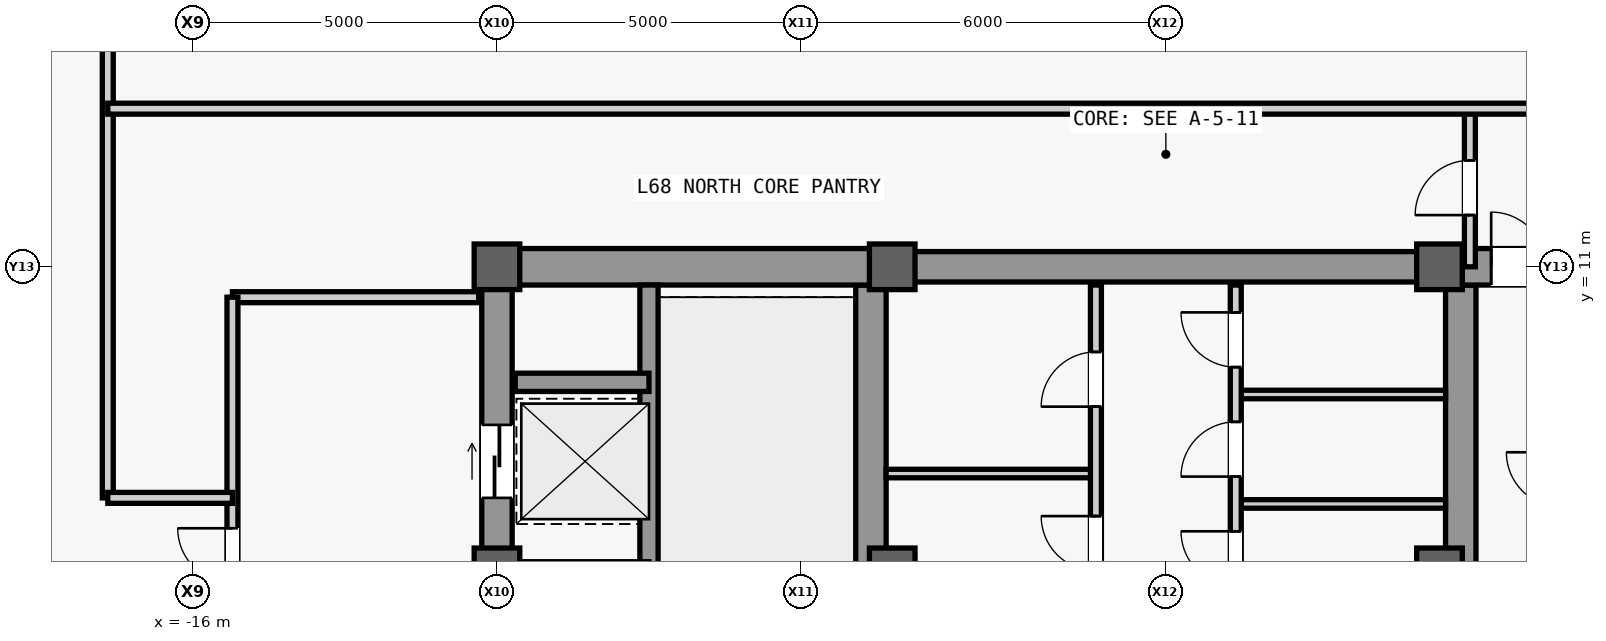
"""IFC4 building model, lengths in metres.
Left out: names, types, materials, properties, quantities, classifications, styles, units other than length and angle.
Written with IfcOpenShell. Run it as: python <this file> out.ifc"""

import sys

from ifc_helpers import new_model, si_unit, direction, frame, frame_2d, origin, origin_2d, place, context, subcontext, project, spatial, rectangle, extrude, source, transform, mapped, element, fill, save


model = new_model("IFC4")
c1 = context("Model", 3, precision=1e-05, world=origin(), true_north=direction((0.0, 1.0)))
c2 = subcontext(c1, "Body", "Model", "MODEL_VIEW")
j1 = project(units=[si_unit("LENGTHUNIT", "METRE"), si_unit("PLANEANGLEUNIT", "RADIAN")], contexts=[c1])
p1 = place(None, origin())
s1 = spatial("IfcSite", under=j1, at=p1, CompositionType="ELEMENT")
p2 = place(p1, origin())
s2 = spatial("IfcBuilding", under=s1, at=p2, CompositionType="ELEMENT")
p3 = place(p2, frame((0.0, 0.0, 289.5)))
s3 = spatial("IfcBuildingStorey", under=s2, at=p3, CompositionType="ELEMENT", Elevation=289.5)
m1 = source(origin(), c2, "Body", "SweptSolid", [
    extrude(rectangle(XDim=22.0, YDim=0.5, at=frame_2d((11.0, 0.0))), origin(), (0.0, 0.0, 1.0), 3.78),
])
p4 = place(p3, frame((-11.0, -11.0, 0.0), z_axis=(0.0, 0.0, 1.0), x_axis=(0.0, 1.0, 0.0)))
e1 = element("IfcWall", 1, at=p4, inside=s3, PredefinedType="SHEAR", context=c2, shape_type="MappedRepresentation", body=[
    mapped(m1, transform((0.0, 0.0, 0.0), scale=1.0)),
])
m2 = source(origin(), c2, "Body", "SweptSolid", [
    extrude(rectangle(XDim=1.1, YDim=2.2, at=frame_2d((0.55, 1.1))), frame((0.0, 0.26, 0.0), z_axis=(0.0, -1.0, 0.0), x_axis=(1.0, 0.0, 0.0)), (0.0, 0.0, 1.0), 0.52),
])
p5 = place(p4, frame((0.8, 0.0, 0.0)))
e2 = element("IfcOpeningElement", 2, at=p5, cuts=e1, PredefinedType="OPENING", context=c2, shape_type="MappedRepresentation", body=[
    mapped(m2, transform((0.0, 0.0, 0.0), scale=1.0)),
])
p6 = place(p4, frame((12.5, 0.0, 0.0)))
e3 = element("IfcOpeningElement", 3, at=p6, cuts=e1, PredefinedType="OPENING", context=c2, shape_type="MappedRepresentation", body=[
    mapped(m2, transform((0.0, 0.0, 0.0), scale=1.0)),
])
m3 = source(origin(), c2, "Body", "SweptSolid", [
    extrude(rectangle(XDim=0.9, YDim=2.15, at=frame_2d((0.45, 1.075))), frame((0.0, 0.26, 0.0), z_axis=(0.0, -1.0, 0.0), x_axis=(1.0, 0.0, 0.0)), (0.0, 0.0, 1.0), 0.52),
])
p7 = place(p4, frame((7.575, 0.0, 0.0)))
e4 = element("IfcOpeningElement", 4, at=p7, cuts=e1, PredefinedType="OPENING", context=c2, shape_type="MappedRepresentation", body=[
    mapped(m3, transform((0.0, 0.0, 0.0), scale=1.0)),
])
m4 = source(origin(), c2, "Body", "SweptSolid", [
    extrude(rectangle(XDim=1.2, YDim=2.3, at=frame_2d((0.6, 1.15))), frame((0.0, 0.26, 0.0), z_axis=(0.0, -1.0, 0.0), x_axis=(1.0, 0.0, 0.0)), (0.0, 0.0, 1.0), 0.52),
])
p8 = place(p4, frame((14.6, 0.0, 0.0)))
e5 = element("IfcOpeningElement", 5, at=p8, cuts=e1, PredefinedType="OPENING", context=c2, shape_type="MappedRepresentation", body=[
    mapped(m4, transform((0.0, 0.0, 0.0), scale=1.0)),
])
p9 = place(p4, frame((18.2, 0.0, 0.0)))
e6 = element("IfcOpeningElement", 6, at=p9, cuts=e1, PredefinedType="OPENING", context=c2, shape_type="MappedRepresentation", body=[
    mapped(m4, transform((0.0, 0.0, 0.0), scale=1.0)),
])
m5 = source(origin(), c2, "Body", "SweptSolid", [
    extrude(rectangle(XDim=1.3, YDim=2.3, at=frame_2d((0.65, 1.15))), frame((0.0, 0.26, 0.0), z_axis=(0.0, -1.0, 0.0), x_axis=(1.0, 0.0, 0.0)), (0.0, 0.0, 1.0), 0.52),
])
p10 = place(p4, frame((2.7, 0.0, 0.0)))
e7 = element("IfcOpeningElement", 7, at=p10, cuts=e1, PredefinedType="OPENING", context=c2, shape_type="MappedRepresentation", body=[
    mapped(m5, transform((0.0, 0.0, 0.0), scale=1.0)),
])
m6 = source(origin(), c2, "Body", "SweptSolid", [
    extrude(rectangle(XDim=21.4, YDim=0.5, at=frame_2d((10.7, 0.0))), origin(), (0.0, 0.0, 1.0), 3.78),
])
for number, where, z_axis, x_axis in (
    (8, (-4.85, -10.7, 0.0), (0.0, 0.0, 1.0), (0.0, 1.0, 0.0)),
    (9, (4.85, -10.7, 0.0), (0.0, 0.0, 1.0), (0.0, 1.0, 0.0)),
):
    element("IfcWall", number, at=place(p3, frame(where, z_axis=z_axis, x_axis=x_axis)), inside=s3, PredefinedType="SHEAR", context=c2, shape_type="MappedRepresentation", body=[
        mapped(m6, transform((0.0, 0.0, 0.0), scale=1.0)),
    ])
m7 = source(origin(), c2, "Body", "SweptSolid", [
    extrude(rectangle(XDim=5.9, YDim=0.6, at=frame_2d((2.95, 0.0))), origin(), (0.0, 0.0, 1.0), 3.78),
])
p11 = place(p3, frame((-10.75, 11.0, 0.0), z_axis=(0.0, 0.0, 1.0), x_axis=(1.0, 0.0, 0.0)))
e10 = element("IfcWall", 10, at=p11, inside=s3, PredefinedType="SHEAR", context=c2, shape_type="MappedRepresentation", body=[
    mapped(m7, transform((0.0, 0.0, 0.0), scale=1.0)),
])
p12 = place(p3, frame((4.85, 11.0, 0.0), z_axis=(0.0, 0.0, 1.0), x_axis=(1.0, 0.0, 0.0)))
e11 = element("IfcWall", 11, at=p12, inside=s3, PredefinedType="SHEAR", context=c2, shape_type="MappedRepresentation", body=[
    mapped(m7, transform((0.0, 0.0, 0.0), scale=1.0)),
])
m8 = source(origin(), c2, "Body", "SweptSolid", [
    extrude(rectangle(XDim=0.9, YDim=2.15, at=frame_2d((0.45, 1.075))), frame((0.0, 0.31, 0.0), z_axis=(0.0, -1.0, 0.0), x_axis=(1.0, 0.0, 0.0)), (0.0, 0.0, 1.0), 0.62),
])
p13 = place(p12, frame((0.5, 0.0, 0.0)))
e12 = element("IfcOpeningElement", 12, at=p13, cuts=e11, PredefinedType="OPENING", context=c2, shape_type="MappedRepresentation", body=[
    mapped(m8, transform((0.0, 0.0, 0.0), scale=1.0)),
])
m9 = source(origin(), c2, "Body", "SweptSolid", [
    extrude(rectangle(XDim=9.2, YDim=0.5, at=frame_2d((4.6, 0.0))), origin(), (0.0, 0.0, 1.0), 3.78),
])
p14 = place(p3, frame((-4.6, 11.0, 0.0), z_axis=(0.0, 0.0, 1.0), x_axis=(1.0, 0.0, 0.0)))
e13 = element("IfcWall", 13, at=p14, inside=s3, PredefinedType="SHEAR", context=c2, shape_type="MappedRepresentation", body=[
    mapped(m9, transform((0.0, 0.0, 0.0), scale=1.0)),
])
m10 = source(origin(), c2, "Body", "SweptSolid", [
    extrude(rectangle(XDim=0.75, YDim=0.75, at=origin_2d()), origin(), (0.0, 0.0, 1.0), 4.0),
])
for number, where, z_axis, x_axis in (
    (14, (-11.0, 6.0, 0.0), (0.0, 0.0, 1.0), (1.0, 0.0, 0.0)),
    (15, (-11.0, 11.0, 0.0), (0.0, 0.0, 1.0), (1.0, 0.0, 0.0)),
    (16, (-4.5, 6.0, 0.0), (0.0, 0.0, 1.0), (1.0, 0.0, 0.0)),
    (17, (-4.5, 11.0, 0.0), (0.0, 0.0, 1.0), (1.0, 0.0, 0.0)),
    (18, (4.5, 6.0, 0.0), (0.0, 0.0, 1.0), (1.0, 0.0, 0.0)),
    (19, (4.5, 11.0, 0.0), (0.0, 0.0, 1.0), (1.0, 0.0, 0.0)),
):
    element("IfcColumn", number, at=place(p3, frame(where, z_axis=z_axis, x_axis=x_axis)), inside=s3, PredefinedType="COLUMN", context=c2, shape_type="MappedRepresentation", body=[
        mapped(m10, transform((0.0, 0.0, 0.0), scale=1.0)),
    ])
m11 = source(origin(), c2, "Body", "SweptSolid", [
    extrude(rectangle(XDim=7.75, YDim=0.3, at=frame_2d((3.875, 0.0))), origin(), (0.0, 0.0, 1.0), 3.78),
])
p15 = place(p3, frame((-8.5, 2.95, 0.0), z_axis=(0.0, 0.0, 1.0), x_axis=(0.0, 1.0, 0.0)))
e20 = element("IfcWall", 20, at=p15, inside=s3, PredefinedType="SHEAR", context=c2, shape_type="MappedRepresentation", body=[
    mapped(m11, transform((0.0, 0.0, 0.0), scale=1.0)),
])
m12 = source(origin(), c2, "Body", "SweptSolid", [
    extrude(rectangle(XDim=2.2, YDim=0.3, at=frame_2d((1.1, 0.0))), origin(), (0.0, 0.0, 1.0), 3.78),
])
for number, where, z_axis, x_axis in (
    (21, (-10.7, 6.0, 0.0), (0.0, 0.0, 1.0), (1.0, 0.0, 0.0)),
    (22, (-10.7, 9.1, 0.0), (0.0, 0.0, 1.0), (1.0, 0.0, 0.0)),
):
    element("IfcWall", number, at=place(p3, frame(where, z_axis=z_axis, x_axis=x_axis)), inside=s3, PredefinedType="SHEAR", context=c2, shape_type="MappedRepresentation", body=[
        mapped(m12, transform((0.0, 0.0, 0.0), scale=1.0)),
    ])
m13 = source(origin(), c2, "Body", "SweptSolid", [
    extrude(rectangle(XDim=4.05, YDim=0.18, at=frame_2d((2.025, 0.0))), origin(), (0.0, 0.0, 1.0), 3.78),
])
p16 = place(p3, frame((-15.35, 10.5, 0.0), z_axis=(0.0, 0.0, 1.0), x_axis=(1.0, 0.0, 0.0)))
e23 = element("IfcWall", 23, at=p16, inside=s3, PredefinedType="PARTITIONING", context=c2, shape_type="MappedRepresentation", body=[
    mapped(m13, transform((0.0, 0.0, 0.0), scale=1.0)),
])
m14 = source(origin(), c2, "Body", "SweptSolid", [
    extrude(rectangle(XDim=16.6, YDim=0.18, at=frame_2d((8.3, 0.0))), origin(), (0.0, 0.0, 1.0), 3.78),
])
p17 = place(p3, frame((-15.35, -6.1, 0.0), z_axis=(0.0, 0.0, 1.0), x_axis=(0.0, 1.0, 0.0)))
e24 = element("IfcWall", 24, at=p17, inside=s3, PredefinedType="PARTITIONING", context=c2, shape_type="MappedRepresentation", body=[
    mapped(m14, transform((0.0, 0.0, 0.0), scale=1.0)),
])
m15 = source(origin(), c2, "Body", "SweptSolid", [
    extrude(rectangle(XDim=1.8, YDim=2.25, at=frame_2d((0.9, 1.125))), frame((0.0, 0.1, 0.0), z_axis=(0.0, -1.0, 0.0), x_axis=(1.0, 0.0, 0.0)), (0.0, 0.0, 1.0), 0.2),
])
p18 = place(p17, frame((2.7, 0.0, 0.0)))
e25 = element("IfcOpeningElement", 25, at=p18, cuts=e24, PredefinedType="OPENING", context=c2, shape_type="MappedRepresentation", body=[
    mapped(m15, transform((0.0, 0.0, 0.0), scale=1.0)),
])
p19 = place(p17, frame((11.0, 0.0, 0.0)))
e26 = element("IfcOpeningElement", 26, at=p19, cuts=e24, PredefinedType="OPENING", context=c2, shape_type="MappedRepresentation", body=[
    mapped(m15, transform((0.0, 0.0, 0.0), scale=1.0)),
])
m16 = source(origin(), c2, "Body", "SweptSolid", [
    extrude(rectangle(XDim=3.45, YDim=0.14, at=frame_2d((1.725, 0.0))), origin(), (0.0, 0.0, 1.0), 3.78),
])
p20 = place(p3, frame((-4.6, 7.6, 0.0), z_axis=(0.0, 0.0, 1.0), x_axis=(1.0, 0.0, 0.0)))
e27 = element("IfcWall", 27, at=p20, inside=s3, PredefinedType="PARTITIONING", context=c2, shape_type="MappedRepresentation", body=[
    mapped(m16, transform((0.0, 0.0, 0.0), scale=1.0)),
])
m17 = source(origin(), c2, "Body", "SweptSolid", [
    extrude(rectangle(XDim=5.4, YDim=0.18, at=frame_2d((2.7, 0.0))), origin(), (0.0, 0.0, 1.0), 3.78),
])
p21 = place(p3, frame((-1.15, 5.3, 0.0), z_axis=(0.0, 0.0, 1.0), x_axis=(0.0, 1.0, 0.0)))
e28 = element("IfcWall", 28, at=p21, inside=s3, PredefinedType="PARTITIONING", context=c2, shape_type="MappedRepresentation", body=[
    mapped(m17, transform((0.0, 0.0, 0.0), scale=1.0)),
])
m18 = source(origin(), c2, "Body", "SweptSolid", [
    extrude(rectangle(XDim=0.9, YDim=2.15, at=frame_2d((0.45, 1.075))), frame((0.0, 0.1, 0.0), z_axis=(0.0, -1.0, 0.0), x_axis=(1.0, 0.0, 0.0)), (0.0, 0.0, 1.0), 0.2),
])
p22 = place(p21, frame((0.7, 0.0, 0.0)))
e29 = element("IfcOpeningElement", 29, at=p22, cuts=e28, PredefinedType="OPENING", context=c2, shape_type="MappedRepresentation", body=[
    mapped(m18, transform((0.0, 0.0, 0.0), scale=1.0)),
])
p23 = place(p21, frame((3.4, 0.0, 0.0)))
e30 = element("IfcOpeningElement", 30, at=p23, cuts=e28, PredefinedType="OPENING", context=c2, shape_type="MappedRepresentation", body=[
    mapped(m18, transform((0.0, 0.0, 0.0), scale=1.0)),
])
for number, where, z_axis, x_axis in (
    (31, (1.15, 7.1, 0.0), (0.0, 0.0, 1.0), (1.0, 0.0, 0.0)),
    (32, (1.15, 8.9, 0.0), (0.0, 0.0, 1.0), (1.0, 0.0, 0.0)),
):
    element("IfcWall", number, at=place(p3, frame(where, z_axis=z_axis, x_axis=x_axis)), inside=s3, PredefinedType="PARTITIONING", context=c2, shape_type="MappedRepresentation", body=[
        mapped(m16, transform((0.0, 0.0, 0.0), scale=1.0)),
    ])
p24 = place(p3, frame((1.15, 5.3, 0.0), z_axis=(0.0, 0.0, 1.0), x_axis=(0.0, 1.0, 0.0)))
e33 = element("IfcWall", 33, at=p24, inside=s3, PredefinedType="PARTITIONING", context=c2, shape_type="MappedRepresentation", body=[
    mapped(m17, transform((0.0, 0.0, 0.0), scale=1.0)),
])
p25 = place(p24, frame((0.45, 0.0, 0.0)))
e34 = element("IfcOpeningElement", 34, at=p25, cuts=e33, PredefinedType="OPENING", context=c2, shape_type="MappedRepresentation", body=[
    mapped(m18, transform((0.0, 0.0, 0.0), scale=1.0)),
])
p26 = place(p24, frame((2.25, 0.0, 0.0)))
e35 = element("IfcOpeningElement", 35, at=p26, cuts=e33, PredefinedType="OPENING", context=c2, shape_type="MappedRepresentation", body=[
    mapped(m18, transform((0.0, 0.0, 0.0), scale=1.0)),
])
p27 = place(p24, frame((4.05, 0.0, 0.0)))
e36 = element("IfcOpeningElement", 36, at=p27, cuts=e33, PredefinedType="OPENING", context=c2, shape_type="MappedRepresentation", body=[
    mapped(m18, transform((0.0, 0.0, 0.0), scale=1.0)),
])
m19 = source(origin(), c2, "Body", "SweptSolid", [
    extrude(rectangle(XDim=8.4, YDim=0.18, at=frame_2d((4.2, 0.0))), origin(), (0.0, 0.0, 1.0), 3.78),
])
p28 = place(p3, frame((-17.4, 7.2, 0.0), z_axis=(0.0, 0.0, 1.0), x_axis=(0.0, 1.0, 0.0)))
e37 = element("IfcWall", 37, at=p28, inside=s3, PredefinedType="PARTITIONING", context=c2, shape_type="MappedRepresentation", body=[
    mapped(m19, transform((0.0, 0.0, 0.0), scale=1.0)),
])
m20 = source(origin(), c2, "Body", "SweptSolid", [
    extrude(rectangle(XDim=2.05, YDim=0.18, at=frame_2d((1.025, 0.0))), origin(), (0.0, 0.0, 1.0), 3.78),
])
p29 = place(p3, frame((-17.4, 7.2, 0.0), z_axis=(0.0, 0.0, 1.0), x_axis=(1.0, 0.0, 0.0)))
e38 = element("IfcWall", 38, at=p29, inside=s3, PredefinedType="PARTITIONING", context=c2, shape_type="MappedRepresentation", body=[
    mapped(m20, transform((0.0, 0.0, 0.0), scale=1.0)),
])
m21 = source(origin(), c2, "Body", "SweptSolid", [
    extrude(rectangle(XDim=2.6, YDim=0.18, at=frame_2d((1.3, 0.0))), origin(), (0.0, 0.0, 1.0), 3.78),
])
p30 = place(p3, frame((5.0, 11.0, 0.0), z_axis=(0.0, 0.0, 1.0), x_axis=(0.0, 1.0, 0.0)))
e39 = element("IfcWall", 39, at=p30, inside=s3, PredefinedType="PARTITIONING", context=c2, shape_type="MappedRepresentation", body=[
    mapped(m21, transform((0.0, 0.0, 0.0), scale=1.0)),
])
p31 = place(p30, frame((0.85, 0.0, 0.0)))
e40 = element("IfcOpeningElement", 40, at=p31, cuts=e39, PredefinedType="OPENING", context=c2, shape_type="MappedRepresentation", body=[
    mapped(m18, transform((0.0, 0.0, 0.0), scale=1.0)),
])
m22 = source(origin(), c2, "Body", "SweptSolid", [
    extrude(rectangle(XDim=32.75, YDim=0.18, at=frame_2d((16.375, 0.0))), origin(), (0.0, 0.0, 1.0), 3.78),
])
p32 = place(p3, frame((-17.4, 13.6, 0.0), z_axis=(0.0, 0.0, 1.0), x_axis=(1.0, 0.0, 0.0)))
e41 = element("IfcWall", 41, at=p32, inside=s3, PredefinedType="PARTITIONING", context=c2, shape_type="MappedRepresentation", body=[
    mapped(m22, transform((0.0, 0.0, 0.0), scale=1.0)),
])
m23 = source(origin(), c2, "Body", "SweptSolid", [
    extrude(rectangle(XDim=1.05, YDim=2.2, at=frame_2d((0.525, 1.1))), frame((0.0, 0.1, 0.0), z_axis=(0.0, -1.0, 0.0), x_axis=(1.0, 0.0, 0.0)), (0.0, 0.0, 1.0), 0.2),
])
p33 = place(p32, frame((27.075, 0.0, 0.0)))
e42 = element("IfcOpeningElement", 42, at=p33, cuts=e41, PredefinedType="OPENING", context=c2, shape_type="MappedRepresentation", body=[
    mapped(m23, transform((0.0, 0.0, 0.0), scale=1.0)),
])
m24 = source(origin(), c2, "Body", "SweptSolid", [
    extrude(rectangle(XDim=0.9, YDim=2.15, at=frame_2d((0.45, 1.075))), frame((0.0, 0.025, 0.0), z_axis=(0.0, -1.0, 0.0), x_axis=(1.0, 0.0, 0.0)), (0.0, 0.0, 1.0), 0.05),
])
p34 = place(p13, origin())
e43 = element("IfcDoor", 43, at=p34, inside=s3, OperationType="SINGLE_SWING_LEFT", PredefinedType="DOOR", context=c2, shape_type="MappedRepresentation", body=[
    mapped(m24, transform((0.0, 0.0, 0.0), scale=1.0)),
])
fill(e12, e43)
m25 = source(origin(), c2, "Body", "SweptSolid", [
    extrude(rectangle(XDim=1.8, YDim=2.25, at=frame_2d((0.9, 1.125))), frame((0.0, 0.025, 0.0), z_axis=(0.0, -1.0, 0.0), x_axis=(1.0, 0.0, 0.0)), (0.0, 0.0, 1.0), 0.05),
])
p35 = place(p19, origin())
e44 = element("IfcDoor", 44, at=p35, inside=s3, OperationType="SINGLE_SWING_RIGHT", PredefinedType="DOOR", context=c2, shape_type="MappedRepresentation", body=[
    mapped(m25, transform((0.0, 0.0, 0.0), scale=1.0)),
])
fill(e26, e44)
p36 = place(p22, origin())
e45 = element("IfcDoor", 45, at=p36, inside=s3, OperationType="SINGLE_SWING_RIGHT", PredefinedType="DOOR", context=c2, shape_type="MappedRepresentation", body=[
    mapped(m24, transform((0.0, 0.0, 0.0), scale=1.0)),
])
fill(e29, e45)
p37 = place(p23, origin())
e46 = element("IfcDoor", 46, at=p37, inside=s3, OperationType="SINGLE_SWING_LEFT", PredefinedType="DOOR", context=c2, shape_type="MappedRepresentation", body=[
    mapped(m24, transform((0.0, 0.0, 0.0), scale=1.0)),
])
fill(e30, e46)
p38 = place(p25, origin())
e47 = element("IfcDoor", 47, at=p38, inside=s3, OperationType="SINGLE_SWING_RIGHT", PredefinedType="DOOR", context=c2, shape_type="MappedRepresentation", body=[
    mapped(m24, transform((0.0, 0.0, 0.0), scale=1.0)),
])
fill(e34, e47)
p39 = place(p26, origin())
e48 = element("IfcDoor", 48, at=p39, inside=s3, OperationType="SINGLE_SWING_LEFT", PredefinedType="DOOR", context=c2, shape_type="MappedRepresentation", body=[
    mapped(m24, transform((0.0, 0.0, 0.0), scale=1.0)),
])
fill(e35, e48)
p40 = place(p27, origin())
e49 = element("IfcDoor", 49, at=p40, inside=s3, OperationType="SINGLE_SWING_RIGHT", PredefinedType="DOOR", context=c2, shape_type="MappedRepresentation", body=[
    mapped(m24, transform((0.0, 0.0, 0.0), scale=1.0)),
])
fill(e36, e49)
p41 = place(p31, origin())
e50 = element("IfcDoor", 50, at=p41, inside=s3, OperationType="SINGLE_SWING_LEFT", PredefinedType="DOOR", context=c2, shape_type="MappedRepresentation", body=[
    mapped(m24, transform((0.0, 0.0, 0.0), scale=1.0)),
])
fill(e40, e50)
m26 = source(origin(), c2, "Body", "SweptSolid", [
    extrude(rectangle(XDim=1.2, YDim=2.3, at=frame_2d((0.6, 1.15))), frame((0.0, 0.025, 0.0), z_axis=(0.0, -1.0, 0.0), x_axis=(1.0, 0.0, 0.0)), (0.0, 0.0, 1.0), 0.05),
])
p42 = place(p9, origin())
e51 = element("IfcDoor", 51, at=p42, inside=s3, OperationType="SLIDING_TO_LEFT", PredefinedType="DOOR", context=c2, shape_type="MappedRepresentation", body=[
    mapped(m26, transform((0.0, 0.0, 0.0), scale=1.0)),
])
fill(e6, e51)
save(model, sys.argv[1])
